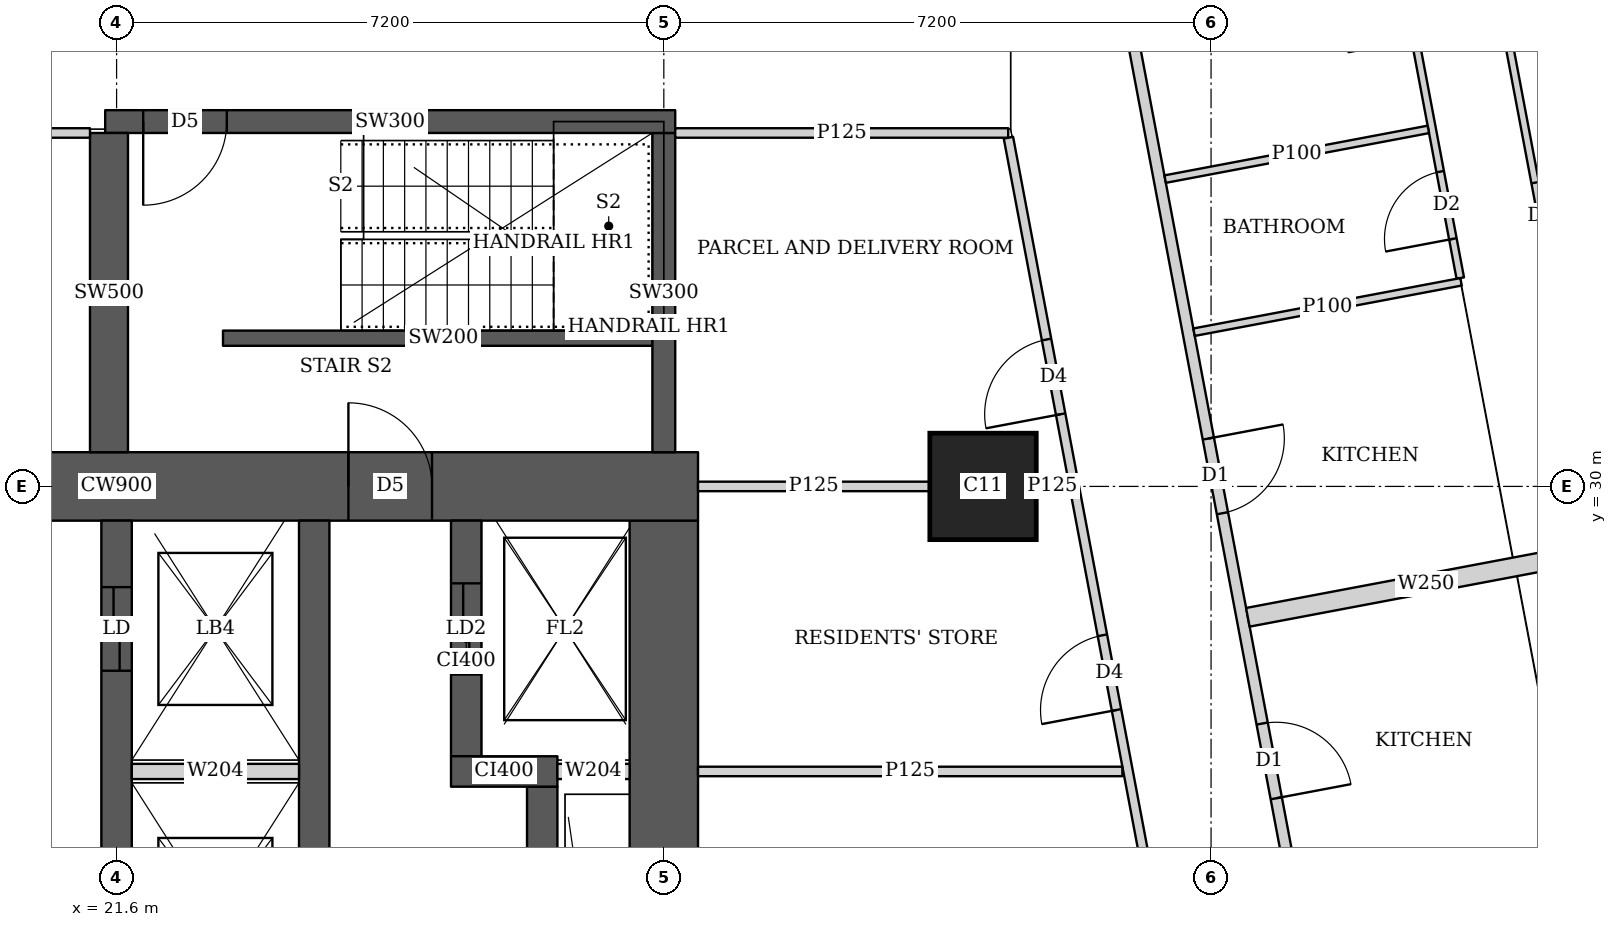
"""IFC4 building model, lengths in metres.
Left out: names, types, materials, properties, quantities, classifications, styles, units other than length and angle.
Written with IfcOpenShell. Run it as: python <this file> out.ifc"""

import sys

from ifc_helpers import new_model, si_unit, direction, frame, frame_2d, origin, origin_2d, place, context, subcontext, project, spatial, rectangle, extrude, element, fill, save


model = new_model("IFC4")
c1 = context("Model", 3, precision=1e-05, world=origin(), true_north=direction((0.0, 1.0)))
c2 = subcontext(c1, "Body", "Model", "MODEL_VIEW")
j1 = project(units=[si_unit("LENGTHUNIT", "METRE"), si_unit("PLANEANGLEUNIT", "RADIAN")], contexts=[c1])
p1 = place(None, origin())
s1 = spatial("IfcSite", under=j1, at=p1, CompositionType="ELEMENT")
p2 = place(p1, origin())
s2 = spatial("IfcBuilding", under=s1, at=p2, CompositionType="ELEMENT")
p3 = place(p2, frame((0.0, 0.0, 204.95)))
s3 = spatial("IfcBuildingStorey", under=s2, at=p3, CompositionType="ELEMENT", Elevation=204.95)
p4 = place(p3, frame((33.0, 30.0, 0.0), z_axis=(0.0, 0.0, 1.0), x_axis=(1.0, 0.0, 0.0)))
e1 = element("IfcColumn", 1, at=p4, inside=s3, PredefinedType="COLUMN", context=c2, shape_type="SweptSolid", body=[
    extrude(rectangle(XDim=1.4, YDim=1.4, at=origin_2d()), origin(), (0.0, 0.0, 1.0), 3.75),
])
p5 = place(p3, frame((13.95, 30.0, 0.0), z_axis=(0.0, 0.0, 1.0), x_axis=(1.0, 0.0, 0.0)))
e2 = element("IfcWall", 2, at=p5, inside=s3, PredefinedType="SHEAR", context=c2, shape_type="SweptSolid", body=[
    extrude(rectangle(XDim=15.3, YDim=0.9, at=frame_2d((7.65, 0.0))), origin(), (0.0, 0.0, 1.0), 3.75),
])
p6 = place(p5, frame((4.45, 0.0, 0.0)))
e3 = element("IfcOpeningElement", 3, at=p6, cuts=e2, PredefinedType="OPENING", context=c2, shape_type="SweptSolid", body=[
    extrude(rectangle(XDim=1.8, YDim=2.1, at=frame_2d((0.9, 1.05))), frame((0.0, 0.46, 0.0), z_axis=(0.0, -1.0, 0.0), x_axis=(1.0, 0.0, 0.0)), (0.0, 0.0, 1.0), 0.92),
])
p7 = place(p5, frame((10.7, 0.0, 0.0)))
e4 = element("IfcOpeningElement", 4, at=p7, cuts=e2, PredefinedType="OPENING", context=c2, shape_type="SweptSolid", body=[
    extrude(rectangle(XDim=1.1, YDim=2.1, at=frame_2d((0.55, 1.05))), frame((0.0, 0.46, 0.0), z_axis=(0.0, -1.0, 0.0), x_axis=(1.0, 0.0, 0.0)), (0.0, 0.0, 1.0), 0.92),
])
p8 = place(p3, frame((28.8, 15.45, 0.0), z_axis=(0.0, 0.0, 1.0), x_axis=(0.0, 1.0, 0.0)))
e5 = element("IfcWall", 5, at=p8, inside=s3, PredefinedType="SHEAR", context=c2, shape_type="SweptSolid", body=[
    extrude(rectangle(XDim=14.1, YDim=0.9, at=frame_2d((7.05, 0.0))), origin(), (0.0, 0.0, 1.0), 3.75),
])
p9 = place(p3, frame((21.6, 15.45, 0.0), z_axis=(0.0, 0.0, 1.0), x_axis=(0.0, 1.0, 0.0)))
e6 = element("IfcWall", 6, at=p9, inside=s3, PredefinedType="SHEAR", context=c2, shape_type="SweptSolid", body=[
    extrude(rectangle(XDim=14.1, YDim=0.4, at=frame_2d((7.05, 0.0))), origin(), (0.0, 0.0, 1.0), 3.75),
])
p10 = place(p9, frame((0.875, 0.0, 0.0)))
e7 = element("IfcOpeningElement", 7, at=p10, cuts=e6, PredefinedType="OPENING", context=c2, shape_type="SweptSolid", body=[
    extrude(rectangle(XDim=1.1, YDim=2.1, at=frame_2d((0.55, 1.05))), frame((0.0, 0.21, 0.0), z_axis=(0.0, -1.0, 0.0), x_axis=(1.0, 0.0, 0.0)), (0.0, 0.0, 1.0), 0.42),
])
p11 = place(p9, frame((4.625, 0.0, 0.0)))
e8 = element("IfcOpeningElement", 8, at=p11, cuts=e6, PredefinedType="OPENING", context=c2, shape_type="SweptSolid", body=[
    extrude(rectangle(XDim=1.1, YDim=2.1, at=frame_2d((0.55, 1.05))), frame((0.0, 0.21, 0.0), z_axis=(0.0, -1.0, 0.0), x_axis=(1.0, 0.0, 0.0)), (0.0, 0.0, 1.0), 0.42),
])
p12 = place(p9, frame((8.375, 0.0, 0.0)))
e9 = element("IfcOpeningElement", 9, at=p12, cuts=e6, PredefinedType="OPENING", context=c2, shape_type="SweptSolid", body=[
    extrude(rectangle(XDim=1.1, YDim=2.1, at=frame_2d((0.55, 1.05))), frame((0.0, 0.21, 0.0), z_axis=(0.0, -1.0, 0.0), x_axis=(1.0, 0.0, 0.0)), (0.0, 0.0, 1.0), 0.42),
])
p13 = place(p9, frame((12.125, 0.0, 0.0)))
e10 = element("IfcOpeningElement", 10, at=p13, cuts=e6, PredefinedType="OPENING", context=c2, shape_type="SweptSolid", body=[
    extrude(rectangle(XDim=1.1, YDim=2.1, at=frame_2d((0.55, 1.05))), frame((0.0, 0.21, 0.0), z_axis=(0.0, -1.0, 0.0), x_axis=(1.0, 0.0, 0.0)), (0.0, 0.0, 1.0), 0.42),
])
p14 = place(p3, frame((24.2, 15.45, 0.0), z_axis=(0.0, 0.0, 1.0), x_axis=(0.0, 1.0, 0.0)))
e11 = element("IfcWall", 11, at=p14, inside=s3, PredefinedType="SHEAR", context=c2, shape_type="SweptSolid", body=[
    extrude(rectangle(XDim=14.1, YDim=0.4, at=frame_2d((7.05, 0.0))), origin(), (0.0, 0.0, 1.0), 3.75),
])
p15 = place(p3, frame((27.2, 18.95, 0.0), z_axis=(0.0, 0.0, 1.0), x_axis=(0.0, 1.0, 0.0)))
e12 = element("IfcWall", 12, at=p15, inside=s3, PredefinedType="SHEAR", context=c2, shape_type="SweptSolid", body=[
    extrude(rectangle(XDim=7.1, YDim=0.4, at=frame_2d((3.55, 0.0))), origin(), (0.0, 0.0, 1.0), 3.75),
])
p16 = place(p3, frame((26.0, 26.25, 0.0), z_axis=(0.0, 0.0, 1.0), x_axis=(1.0, 0.0, 0.0)))
e13 = element("IfcWall", 13, at=p16, inside=s3, PredefinedType="SHEAR", context=c2, shape_type="SweptSolid", body=[
    extrude(rectangle(XDim=1.4, YDim=0.4, at=frame_2d((0.7, 0.0))), origin(), (0.0, 0.0, 1.0), 3.75),
])
p17 = place(p3, frame((26.2, 26.45, 0.0), z_axis=(0.0, 0.0, 1.0), x_axis=(0.0, 1.0, 0.0)))
e14 = element("IfcWall", 14, at=p17, inside=s3, PredefinedType="SHEAR", context=c2, shape_type="SweptSolid", body=[
    extrude(rectangle(XDim=3.1, YDim=0.4, at=frame_2d((1.55, 0.0))), origin(), (0.0, 0.0, 1.0), 3.75),
])
p18 = place(p17, frame((1.075, 0.0, 0.0)))
e15 = element("IfcOpeningElement", 15, at=p18, cuts=e14, PredefinedType="OPENING", context=c2, shape_type="SweptSolid", body=[
    extrude(rectangle(XDim=1.2, YDim=2.1, at=frame_2d((0.6, 1.05))), frame((0.0, 0.21, 0.0), z_axis=(0.0, -1.0, 0.0), x_axis=(1.0, 0.0, 0.0)), (0.0, 0.0, 1.0), 0.42),
])
p19 = place(p3, frame((21.45, 34.8, 0.0), z_axis=(0.0, 0.0, 1.0), x_axis=(1.0, 0.0, 0.0)))
e16 = element("IfcWall", 16, at=p19, inside=s3, PredefinedType="SHEAR", context=c2, shape_type="SweptSolid", body=[
    extrude(rectangle(XDim=7.5, YDim=0.3, at=frame_2d((3.75, 0.0))), origin(), (0.0, 0.0, 1.0), 3.75),
])
p20 = place(p19, frame((0.5, 0.0, 0.0)))
e17 = element("IfcOpeningElement", 17, at=p20, cuts=e16, PredefinedType="OPENING", context=c2, shape_type="SweptSolid", body=[
    extrude(rectangle(XDim=1.1, YDim=2.1, at=frame_2d((0.55, 1.05))), frame((0.0, 0.16, 0.0), z_axis=(0.0, -1.0, 0.0), x_axis=(1.0, 0.0, 0.0)), (0.0, 0.0, 1.0), 0.32),
])
p21 = place(p3, frame((21.5, 30.45, 0.0), z_axis=(0.0, 0.0, 1.0), x_axis=(0.0, 1.0, 0.0)))
e18 = element("IfcWall", 18, at=p21, inside=s3, PredefinedType="SHEAR", context=c2, shape_type="SweptSolid", body=[
    extrude(rectangle(XDim=4.2, YDim=0.5, at=frame_2d((2.1, 0.0))), origin(), (0.0, 0.0, 1.0), 3.75),
])
p22 = place(p3, frame((28.8, 30.45, 0.0), z_axis=(0.0, 0.0, 1.0), x_axis=(0.0, 1.0, 0.0)))
e19 = element("IfcWall", 19, at=p22, inside=s3, PredefinedType="SHEAR", context=c2, shape_type="SweptSolid", body=[
    extrude(rectangle(XDim=4.2, YDim=0.3, at=frame_2d((2.1, 0.0))), origin(), (0.0, 0.0, 1.0), 3.75),
])
p23 = place(p3, frame((33.68, 42.723, 0.0), z_axis=(0.0, 0.0, 1.0), x_axis=(0.185601160014, -0.982625162207, 0.0)))
e20 = element("IfcWall", 20, at=p23, inside=s3, PredefinedType="SOLIDWALL", context=c2, shape_type="SweptSolid", body=[
    extrude(rectangle(XDim=41.051, YDim=0.15, at=frame_2d((20.526, 0.0))), origin(), (0.0, 0.0, 1.0), 2.5),
])
p24 = place(p23, frame((12.307, 0.0, 0.0)))
e21 = element("IfcOpeningElement", 21, at=p24, cuts=e20, PredefinedType="OPENING", context=c2, shape_type="SweptSolid", body=[
    extrude(rectangle(XDim=1.0, YDim=2.1, at=frame_2d((0.5, 1.05))), frame((0.0, 0.085, 0.0), z_axis=(0.0, -1.0, 0.0), x_axis=(1.0, 0.0, 0.0)), (0.0, 0.0, 1.0), 0.17),
])
p25 = place(p23, frame((16.123, 0.0, 0.0)))
e22 = element("IfcOpeningElement", 22, at=p25, cuts=e20, PredefinedType="OPENING", context=c2, shape_type="SweptSolid", body=[
    extrude(rectangle(XDim=1.0, YDim=2.1, at=frame_2d((0.5, 1.05))), frame((0.0, 0.085, 0.0), z_axis=(0.0, -1.0, 0.0), x_axis=(1.0, 0.0, 0.0)), (0.0, 0.0, 1.0), 0.17),
])
p26 = place(p23, frame((30.902, 0.0, 0.0)))
e23 = element("IfcOpeningElement", 23, at=p26, cuts=e20, PredefinedType="OPENING", context=c2, shape_type="SweptSolid", body=[
    extrude(rectangle(XDim=1.0, YDim=2.1, at=frame_2d((0.5, 1.05))), frame((0.0, 0.085, 0.0), z_axis=(0.0, -1.0, 0.0), x_axis=(1.0, 0.0, 0.0)), (0.0, 0.0, 1.0), 0.17),
])
p27 = place(p3, frame((38.764, 41.941, 0.0), z_axis=(0.0, 0.0, 1.0), x_axis=(0.185548572312, -0.982635093671, 0.0)))
e24 = element("IfcWall", 24, at=p27, inside=s3, PredefinedType="PARTITIONING", context=c2, shape_type="SweptSolid", body=[
    extrude(rectangle(XDim=9.135, YDim=0.1, at=frame_2d((4.568, 0.0))), origin(), (0.0, 0.0, 1.0), 3.5),
])
p28 = place(p27, frame((8.085, 0.0, 0.0)))
e25 = element("IfcOpeningElement", 25, at=p28, cuts=e24, PredefinedType="OPENING", context=c2, shape_type="SweptSolid", body=[
    extrude(rectangle(XDim=0.9, YDim=2.1, at=frame_2d((0.45, 1.05))), frame((0.0, 0.06, 0.0), z_axis=(0.0, -1.0, 0.0), x_axis=(1.0, 0.0, 0.0)), (0.0, 0.0, 1.0), 0.12),
])
p29 = place(p27, frame((3.7, 0.0, 0.0)))
e26 = element("IfcOpeningElement", 26, at=p29, cuts=e24, PredefinedType="OPENING", context=c2, shape_type="SweptSolid", body=[
    extrude(rectangle(XDim=0.9, YDim=2.1, at=frame_2d((0.45, 1.05))), frame((0.0, 0.06, 0.0), z_axis=(0.0, -1.0, 0.0), x_axis=(1.0, 0.0, 0.0)), (0.0, 0.0, 1.0), 0.12),
])
p30 = place(p3, frame((37.473, 42.309, 0.0), z_axis=(0.0, 0.0, 1.0), x_axis=(0.185491912953, -0.982645790827, 0.0)))
e27 = element("IfcWall", 27, at=p30, inside=s3, PredefinedType="PARTITIONING", context=c2, shape_type="SweptSolid", body=[
    extrude(rectangle(XDim=9.737, YDim=0.1, at=frame_2d((4.869, 0.0))), origin(), (0.0, 0.0, 1.0), 3.5),
])
p31 = place(p30, frame((8.312, 0.0, 0.0)))
e28 = element("IfcOpeningElement", 28, at=p31, cuts=e27, PredefinedType="OPENING", context=c2, shape_type="SweptSolid", body=[
    extrude(rectangle(XDim=0.9, YDim=2.1, at=frame_2d((0.45, 1.05))), frame((0.0, 0.06, 0.0), z_axis=(0.0, -1.0, 0.0), x_axis=(1.0, 0.0, 0.0)), (0.0, 0.0, 1.0), 0.12),
])
p32 = place(p30, frame((2.853, 0.0, 0.0)))
e29 = element("IfcOpeningElement", 29, at=p32, cuts=e27, PredefinedType="OPENING", context=c2, shape_type="SweptSolid", body=[
    extrude(rectangle(XDim=0.9, YDim=2.1, at=frame_2d((0.45, 1.05))), frame((0.0, 0.06, 0.0), z_axis=(0.0, -1.0, 0.0), x_axis=(1.0, 0.0, 0.0)), (0.0, 0.0, 1.0), 0.12),
])
p33 = place(p30, frame((5.644, 0.0, 0.0)))
e30 = element("IfcOpeningElement", 30, at=p33, cuts=e27, PredefinedType="OPENING", context=c2, shape_type="SweptSolid", body=[
    extrude(rectangle(XDim=0.9, YDim=2.1, at=frame_2d((0.45, 1.05))), frame((0.0, 0.06, 0.0), z_axis=(0.0, -1.0, 0.0), x_axis=(1.0, 0.0, 0.0)), (0.0, 0.0, 1.0), 0.12),
])
p34 = place(p3, frame((39.289, 32.692, 0.0), z_axis=(0.0, 0.0, 1.0), x_axis=(-0.982662827464, -0.185401638399, 0.0)))
e31 = element("IfcWall", 31, at=p34, inside=s3, PredefinedType="PARTITIONING", context=c2, shape_type="SweptSolid", body=[
    extrude(rectangle(XDim=3.575, YDim=0.1, at=frame_2d((1.788, 0.0))), origin(), (0.0, 0.0, 1.0), 3.5),
])
p35 = place(p3, frame((38.859, 34.697, 0.0), z_axis=(0.0, 0.0, 1.0), x_axis=(-0.982626628545, -0.185593396635, 0.0)))
e32 = element("IfcWall", 32, at=p35, inside=s3, PredefinedType="PARTITIONING", context=c2, shape_type="SweptSolid", body=[
    extrude(rectangle(XDim=3.524, YDim=0.1, at=frame_2d((1.762, 0.0))), origin(), (0.0, 0.0, 1.0), 3.5),
])
p36 = place(p3, frame((41.177, 29.164, 0.0), z_axis=(0.0, 0.0, 1.0), x_axis=(-0.982642846239, -0.185507511263, 0.0)))
e33 = element("IfcWall", 33, at=p36, inside=s3, PredefinedType="SOLIDWALL", context=c2, shape_type="SweptSolid", body=[
    extrude(rectangle(XDim=4.776, YDim=0.25, at=frame_2d((2.388, 0.0))), origin(), (0.0, 0.0, 1.0), 2.5),
])
p37 = place(p3, frame((10.713, 34.65, 0.0), z_axis=(0.0, 0.0, 1.0), x_axis=(1.0, 0.0, 0.0)))
e34 = element("IfcWall", 34, at=p37, inside=s3, PredefinedType="PARTITIONING", context=c2, shape_type="SweptSolid", body=[
    extrude(rectangle(XDim=10.537, YDim=0.125, at=frame_2d((5.269, 0.0))), origin(), (0.0, 0.0, 1.0), 3.5),
])
p38 = place(p37, frame((7.187, 0.0, 0.0)))
e35 = element("IfcOpeningElement", 35, at=p38, cuts=e34, PredefinedType="OPENING", context=c2, shape_type="SweptSolid", body=[
    extrude(rectangle(XDim=1.8, YDim=2.1, at=frame_2d((0.9, 1.05))), frame((0.0, 0.073, 0.0), z_axis=(0.0, -1.0, 0.0), x_axis=(1.0, 0.0, 0.0)), (0.0, 0.0, 1.0), 0.145),
])
p39 = place(p3, frame((28.95, 34.65, 0.0), z_axis=(0.0, 0.0, 1.0), x_axis=(1.0, 0.0, 0.0)))
e36 = element("IfcWall", 36, at=p39, inside=s3, PredefinedType="PARTITIONING", context=c2, shape_type="SweptSolid", body=[
    extrude(rectangle(XDim=4.381, YDim=0.125, at=frame_2d((2.19, 0.0))), origin(), (0.0, 0.0, 1.0), 3.5),
])
p40 = place(p3, frame((37.9, 10.413, 0.0), z_axis=(0.0, 0.0, 1.0), x_axis=(-0.185589740669, 0.982627319058, 0.0)))
e37 = element("IfcWall", 37, at=p40, inside=s3, PredefinedType="PARTITIONING", context=c2, shape_type="SweptSolid", body=[
    extrude(rectangle(XDim=24.602, YDim=0.125, at=frame_2d((12.301, 0.0))), origin(), (0.0, 0.0, 1.0), 2.5),
])
p41 = place(p40, frame((0.708, 0.0, 0.0)))
e38 = element("IfcOpeningElement", 38, at=p41, cuts=e37, PredefinedType="OPENING", context=c2, shape_type="SweptSolid", body=[
    extrude(rectangle(XDim=1.0, YDim=2.1, at=frame_2d((0.5, 1.05))), frame((0.0, 0.073, 0.0), z_axis=(0.0, -1.0, 0.0), x_axis=(1.0, 0.0, 0.0)), (0.0, 0.0, 1.0), 0.145),
])
p42 = place(p40, frame((5.65, 0.0, 0.0)))
e39 = element("IfcOpeningElement", 39, at=p42, cuts=e37, PredefinedType="OPENING", context=c2, shape_type="SweptSolid", body=[
    extrude(rectangle(XDim=1.0, YDim=2.1, at=frame_2d((0.5, 1.05))), frame((0.0, 0.073, 0.0), z_axis=(0.0, -1.0, 0.0), x_axis=(1.0, 0.0, 0.0)), (0.0, 0.0, 1.0), 0.145),
])
p43 = place(p40, frame((13.124, 0.0, 0.0)))
e40 = element("IfcOpeningElement", 40, at=p43, cuts=e37, PredefinedType="OPENING", context=c2, shape_type="SweptSolid", body=[
    extrude(rectangle(XDim=1.0, YDim=2.1, at=frame_2d((0.5, 1.05))), frame((0.0, 0.073, 0.0), z_axis=(0.0, -1.0, 0.0), x_axis=(1.0, 0.0, 0.0)), (0.0, 0.0, 1.0), 0.145),
])
p44 = place(p40, frame((16.94, 0.0, 0.0)))
e41 = element("IfcOpeningElement", 41, at=p44, cuts=e37, PredefinedType="OPENING", context=c2, shape_type="SweptSolid", body=[
    extrude(rectangle(XDim=1.0, YDim=2.1, at=frame_2d((0.5, 1.05))), frame((0.0, 0.073, 0.0), z_axis=(0.0, -1.0, 0.0), x_axis=(1.0, 0.0, 0.0)), (0.0, 0.0, 1.0), 0.145),
])
p45 = place(p40, frame((20.9, 0.0, 0.0)))
e42 = element("IfcOpeningElement", 42, at=p45, cuts=e37, PredefinedType="OPENING", context=c2, shape_type="SweptSolid", body=[
    extrude(rectangle(XDim=1.0, YDim=2.1, at=frame_2d((0.5, 1.05))), frame((0.0, 0.073, 0.0), z_axis=(0.0, -1.0, 0.0), x_axis=(1.0, 0.0, 0.0)), (0.0, 0.0, 1.0), 0.145),
])
p46 = place(p3, frame((29.25, 26.25, 0.0), z_axis=(0.0, 0.0, 1.0), x_axis=(1.0, 0.0, 0.0)))
e43 = element("IfcWall", 43, at=p46, inside=s3, PredefinedType="PARTITIONING", context=c2, shape_type="SweptSolid", body=[
    extrude(rectangle(XDim=5.583, YDim=0.125, at=frame_2d((2.792, 0.0))), origin(), (0.0, 0.0, 1.0), 3.5),
])
p47 = place(p3, frame((29.25, 30.0, 0.0), z_axis=(0.0, 0.0, 1.0), x_axis=(1.0, 0.0, 0.0)))
e44 = element("IfcWall", 44, at=p47, inside=s3, PredefinedType="PARTITIONING", context=c2, shape_type="SweptSolid", body=[
    extrude(rectangle(XDim=3.049, YDim=0.125, at=frame_2d((1.524, 0.0))), origin(), (0.0, 0.0, 1.0), 3.5),
])
p48 = place(p3, frame((33.701, 30.0, 0.0), z_axis=(0.0, 0.0, 1.0), x_axis=(1.0, 0.0, 0.0)))
e45 = element("IfcWall", 45, at=p48, inside=s3, PredefinedType="PARTITIONING", context=c2, shape_type="SweptSolid", body=[
    extrude(rectangle(XDim=0.424, YDim=0.125, at=frame_2d((0.212, 0.0))), origin(), (0.0, 0.0, 1.0), 2.5),
])
p49 = place(p3, frame((23.0, 31.95, 0.0), z_axis=(0.0, 0.0, 1.0), x_axis=(1.0, 0.0, 0.0)))
e46 = element("IfcWall", 46, at=p49, inside=s3, PredefinedType="SHEAR", context=c2, shape_type="SweptSolid", body=[
    extrude(rectangle(XDim=5.8, YDim=0.2, at=frame_2d((2.9, 0.0))), origin(), (0.0, 0.0, 1.0), 3.75),
])
p50 = place(p3, frame((21.8, 26.25, 0.0), z_axis=(0.0, 0.0, 1.0), x_axis=(1.0, 0.0, 0.0)))
e47 = element("IfcWall", 47, at=p50, inside=s3, PredefinedType="SOLIDWALL", context=c2, shape_type="SweptSolid", body=[
    extrude(rectangle(XDim=2.2, YDim=0.2, at=frame_2d((1.1, 0.0))), origin(), (0.0, 0.0, 1.0), 3.5),
])
p51 = place(p3, frame((27.4, 26.25, 0.0), z_axis=(0.0, 0.0, 1.0), x_axis=(1.0, 0.0, 0.0)))
e48 = element("IfcWall", 48, at=p51, inside=s3, PredefinedType="SOLIDWALL", context=c2, shape_type="SweptSolid", body=[
    extrude(rectangle(XDim=0.95, YDim=0.2, at=frame_2d((0.475, 0.0))), origin(), (0.0, 0.0, 1.0), 3.5),
])
p52 = place(p28, origin())
e49 = element("IfcDoor", 49, at=p52, inside=s3, OperationType="SINGLE_SWING_RIGHT", PredefinedType="DOOR", context=c2, shape_type="SweptSolid", body=[
    extrude(rectangle(XDim=0.9, YDim=2.1, at=frame_2d((0.45, 1.05))), frame((0.0, 0.025, 0.0), z_axis=(0.0, -1.0, 0.0), x_axis=(1.0, 0.0, 0.0)), (0.0, 0.0, 1.0), 0.05),
])
fill(e25, e49)
p53 = place(p31, origin())
e50 = element("IfcDoor", 50, at=p53, inside=s3, OperationType="SINGLE_SWING_LEFT", PredefinedType="DOOR", context=c2, shape_type="SweptSolid", body=[
    extrude(rectangle(XDim=0.9, YDim=2.1, at=frame_2d((0.45, 1.05))), frame((0.0, 0.025, 0.0), z_axis=(0.0, -1.0, 0.0), x_axis=(1.0, 0.0, 0.0)), (0.0, 0.0, 1.0), 0.05),
])
fill(e28, e50)
p54 = place(p24, origin())
e51 = element("IfcDoor", 51, at=p54, inside=s3, OperationType="SINGLE_SWING_LEFT", PredefinedType="DOOR", context=c2, shape_type="SweptSolid", body=[
    extrude(rectangle(XDim=1.0, YDim=2.1, at=frame_2d((0.5, 1.05))), frame((0.0, 0.025, 0.0), z_axis=(0.0, -1.0, 0.0), x_axis=(1.0, 0.0, 0.0)), (0.0, 0.0, 1.0), 0.05),
])
fill(e21, e51)
p55 = place(p25, origin())
e52 = element("IfcDoor", 52, at=p55, inside=s3, OperationType="SINGLE_SWING_RIGHT", PredefinedType="DOOR", context=c2, shape_type="SweptSolid", body=[
    extrude(rectangle(XDim=1.0, YDim=2.1, at=frame_2d((0.5, 1.05))), frame((0.0, 0.025, 0.0), z_axis=(0.0, -1.0, 0.0), x_axis=(1.0, 0.0, 0.0)), (0.0, 0.0, 1.0), 0.05),
])
fill(e22, e52)
p56 = place(p44, origin())
e53 = element("IfcDoor", 53, at=p56, inside=s3, OperationType="SINGLE_SWING_LEFT", PredefinedType="DOOR", context=c2, shape_type="SweptSolid", body=[
    extrude(rectangle(XDim=1.0, YDim=2.1, at=frame_2d((0.5, 1.05))), frame((0.0, 0.025, 0.0), z_axis=(0.0, -1.0, 0.0), x_axis=(1.0, 0.0, 0.0)), (0.0, 0.0, 1.0), 0.05),
])
fill(e41, e53)
p57 = place(p45, origin())
e54 = element("IfcDoor", 54, at=p57, inside=s3, OperationType="SINGLE_SWING_LEFT", PredefinedType="DOOR", context=c2, shape_type="SweptSolid", body=[
    extrude(rectangle(XDim=1.0, YDim=2.1, at=frame_2d((0.5, 1.05))), frame((0.0, 0.025, 0.0), z_axis=(0.0, -1.0, 0.0), x_axis=(1.0, 0.0, 0.0)), (0.0, 0.0, 1.0), 0.05),
])
fill(e42, e54)
p58 = place(p7, origin())
e55 = element("IfcDoor", 55, at=p58, inside=s3, OperationType="SINGLE_SWING_LEFT", PredefinedType="DOOR", context=c2, shape_type="SweptSolid", body=[
    extrude(rectangle(XDim=1.1, YDim=2.1, at=frame_2d((0.55, 1.05))), frame((0.0, 0.025, 0.0), z_axis=(0.0, -1.0, 0.0), x_axis=(1.0, 0.0, 0.0)), (0.0, 0.0, 1.0), 0.05),
])
fill(e4, e55)
p59 = place(p18, origin())
e56 = element("IfcDoor", 56, at=p59, inside=s3, OperationType="DOUBLE_DOOR_SLIDING", PredefinedType="DOOR", context=c2, shape_type="SweptSolid", body=[
    extrude(rectangle(XDim=1.2, YDim=2.1, at=frame_2d((0.6, 1.05))), frame((0.0, 0.025, 0.0), z_axis=(0.0, -1.0, 0.0), x_axis=(1.0, 0.0, 0.0)), (0.0, 0.0, 1.0), 0.05),
])
fill(e15, e56)
p60 = place(p13, origin())
e57 = element("IfcDoor", 57, at=p60, inside=s3, OperationType="DOUBLE_DOOR_SLIDING", PredefinedType="DOOR", context=c2, shape_type="SweptSolid", body=[
    extrude(rectangle(XDim=1.1, YDim=2.1, at=frame_2d((0.55, 1.05))), frame((0.0, 0.025, 0.0), z_axis=(0.0, -1.0, 0.0), x_axis=(1.0, 0.0, 0.0)), (0.0, 0.0, 1.0), 0.05),
])
fill(e10, e57)
p61 = place(p20, origin())
e58 = element("IfcDoor", 58, at=p61, inside=s3, OperationType="SINGLE_SWING_RIGHT", PredefinedType="DOOR", context=c2, shape_type="SweptSolid", body=[
    extrude(rectangle(XDim=1.1, YDim=2.1, at=frame_2d((0.55, 1.05))), frame((0.0, 0.025, 0.0), z_axis=(0.0, -1.0, 0.0), x_axis=(1.0, 0.0, 0.0)), (0.0, 0.0, 1.0), 0.05),
])
fill(e17, e58)
save(model, sys.argv[1])
